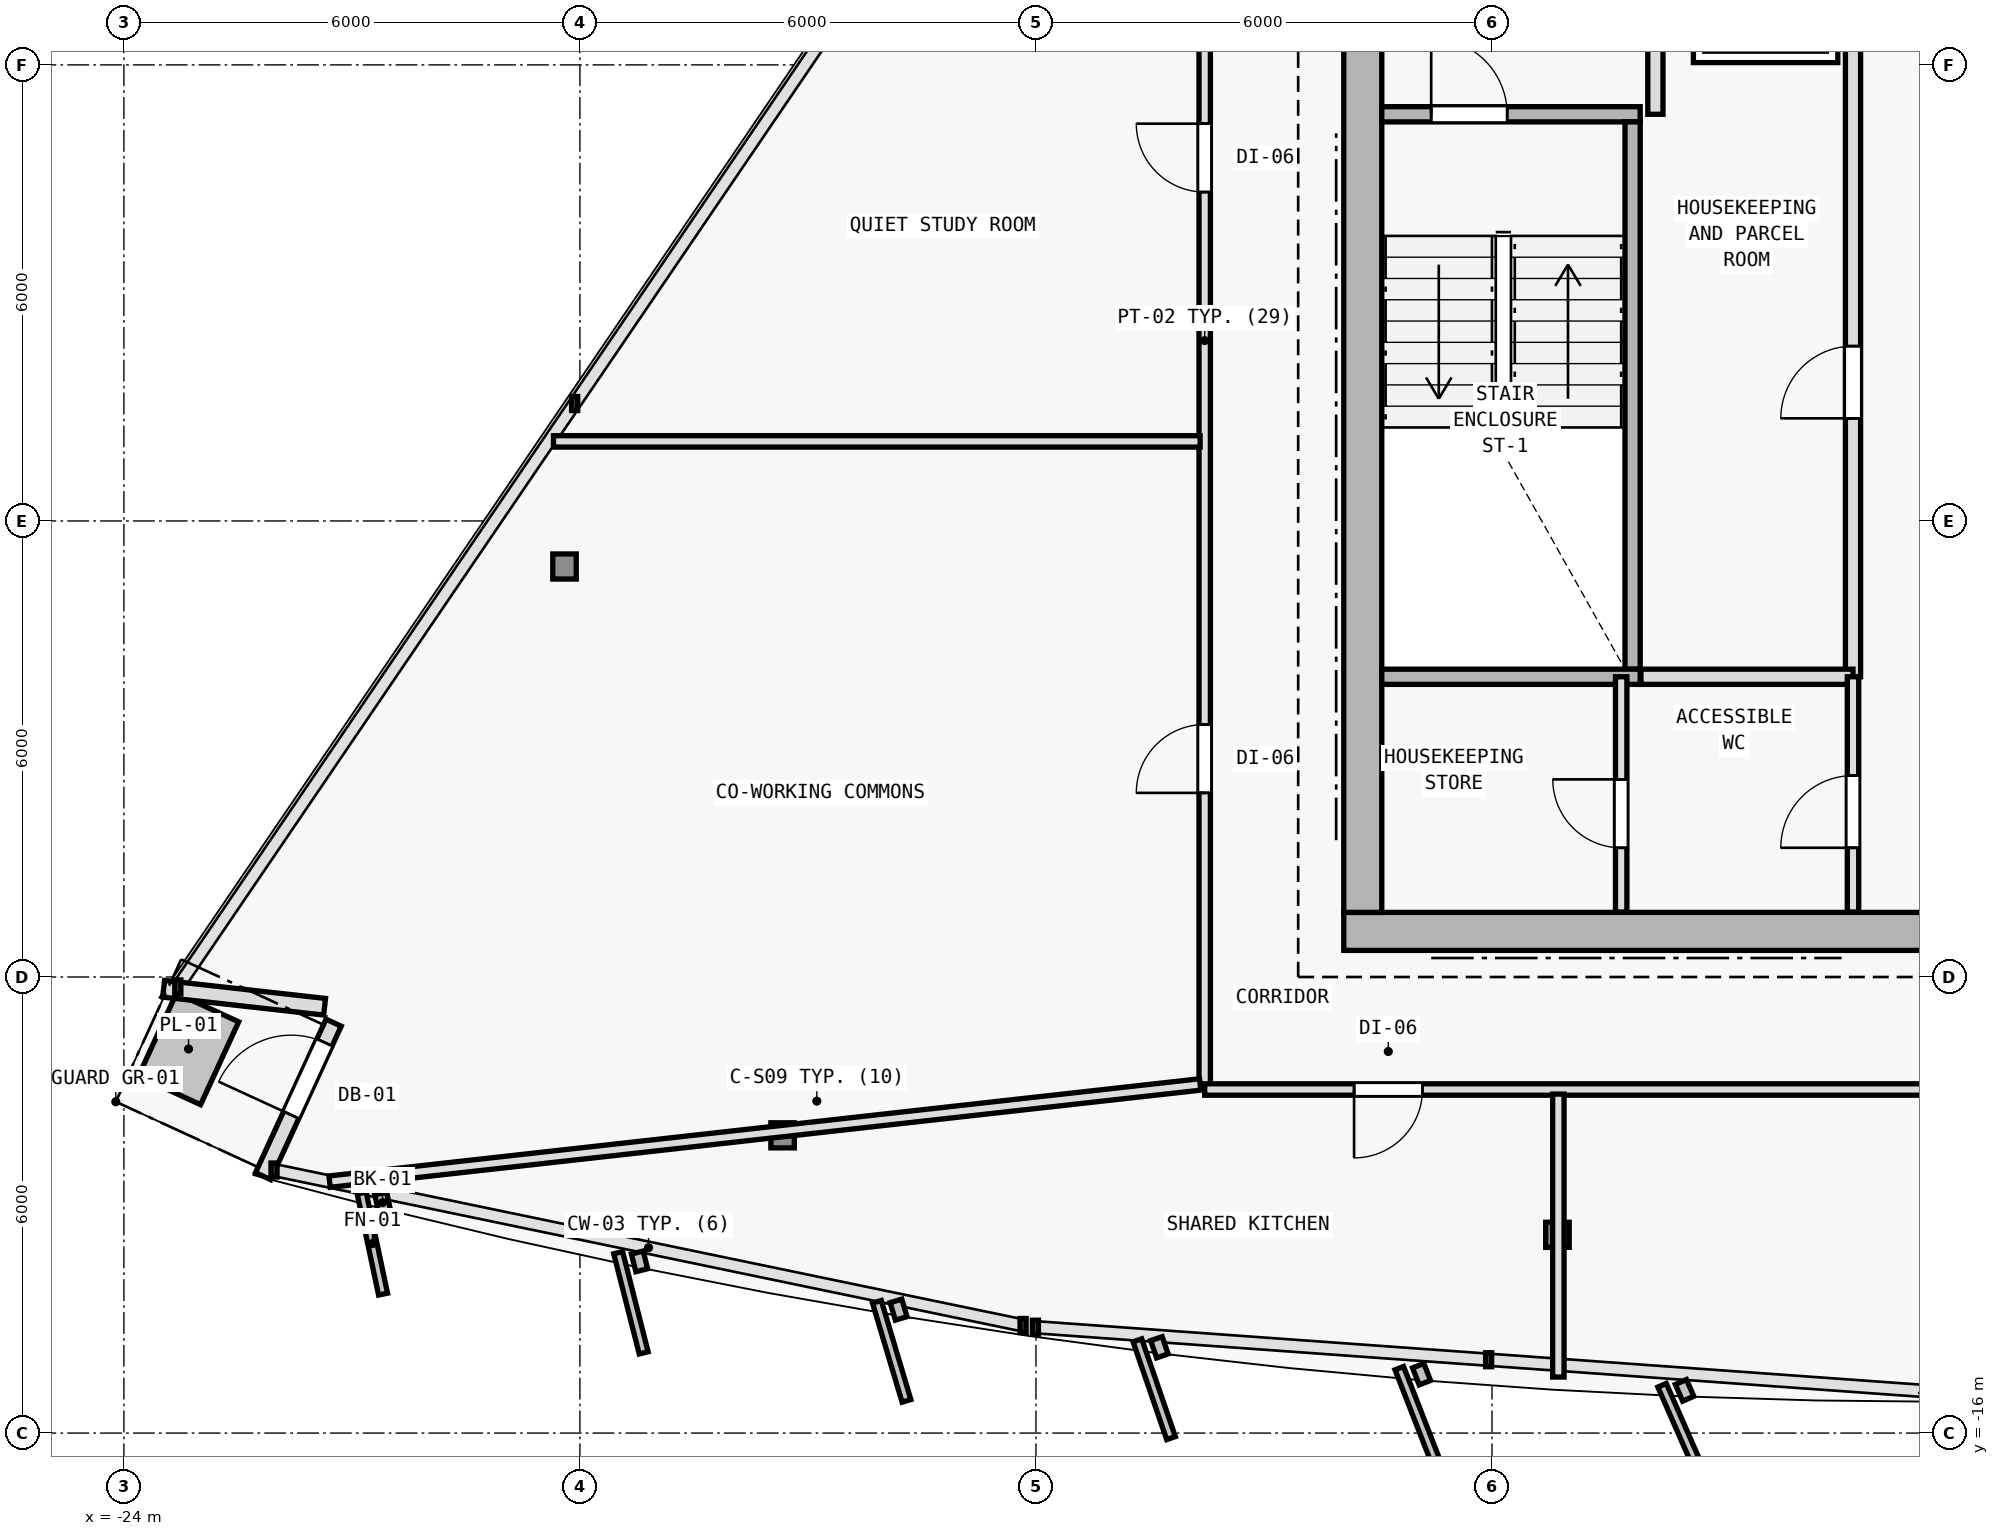
"""IFC4 building model, lengths in metres.
Left out: names, types, materials, properties, quantities, classifications, styles, units other than length and angle.
Written with IfcOpenShell. Run it as: python <this file> out.ifc"""

import sys

from ifc_helpers import new_model, si_unit, direction, frame, frame_2d, origin, origin_2d, place, context, subcontext, project, spatial, rectangle, i_section, extrude, element, fill, save


model = new_model("IFC4")
c1 = context("Model", 3, precision=1e-05, world=origin(), true_north=direction((0.0, 1.0)))
c2 = subcontext(c1, "Body", "Model", "MODEL_VIEW")
j1 = project(units=[si_unit("LENGTHUNIT", "METRE"), si_unit("PLANEANGLEUNIT", "RADIAN")], contexts=[c1])
p1 = place(None, origin())
s1 = spatial("IfcSite", under=j1, at=p1, CompositionType="ELEMENT")
p2 = place(p1, origin())
s2 = spatial("IfcBuilding", under=s1, at=p2, CompositionType="ELEMENT")
p3 = place(p2, frame((0.0, 0.0, 279.6)))
s3 = spatial("IfcBuildingStorey", under=s2, at=p3, CompositionType="ELEMENT", Elevation=279.6)
for number, where, z_axis, x_axis in (
    (1, (-7.7, -9.4, 0.0), (0.0, 0.0, 1.0), (1.0, 0.0, 0.0)),
    (2, (-7.7, 2.0, 0.0), (0.0, 0.0, 1.0), (1.0, 0.0, 0.0)),
):
    element("IfcColumn", number, at=place(p3, frame(where, z_axis=z_axis, x_axis=x_axis)), inside=s3, PredefinedType="COLUMN", context=c2, shape_type="SweptSolid", body=[
        extrude(i_section(OverallWidth=0.374, OverallDepth=0.372, WebThickness=0.012, FlangeThickness=0.02, FilletRadius=0.015, at=origin_2d()), origin(), (0.0, 0.0, 1.0), 3.6),
    ])
p4 = place(p3, frame((-15.333, -12.083, 0.005), z_axis=(0.020594893987, 0.033509183946, 0.999226193078), x_axis=(-0.851954850327, 0.523615252838, 0.0)))
e3 = element("IfcColumn", 3, at=p4, inside=s3, PredefinedType="COLUMN", context=c2, shape_type="SweptSolid", body=[
    extrude(i_section(OverallWidth=0.309, OverallDepth=0.33, WebThickness=0.011, FlangeThickness=0.019, FilletRadius=0.027, at=origin_2d()), origin(), (0.0, 0.0, 1.0), 3.592),
])
p5 = place(p3, frame((-5.139, -13.392, 0.005), z_axis=(0.006865841702, 0.035280909339, 0.999353850072), x_axis=(-0.981585848295, 0.191021523464, 0.0)))
e4 = element("IfcColumn", 4, at=p5, inside=s3, PredefinedType="COLUMN", context=c2, shape_type="SweptSolid", body=[
    extrude(i_section(OverallWidth=0.309, OverallDepth=0.33, WebThickness=0.011, FlangeThickness=0.019, FilletRadius=0.027, at=origin_2d()), origin(), (0.0, 0.0, 1.0), 3.592),
])
p6 = place(p3, frame((-18.203, -4.599, 0.005), z_axis=(0.025222449659, 0.021619242565, 0.999448065876), x_axis=(-0.650791373456, 0.759256602365, 0.0)))
e5 = element("IfcColumn", 5, at=p6, inside=s3, PredefinedType="COLUMN", context=c2, shape_type="SweptSolid", body=[
    extrude(i_section(OverallWidth=0.309, OverallDepth=0.33, WebThickness=0.011, FlangeThickness=0.019, FilletRadius=0.027, at=origin_2d()), origin(), (0.0, 0.0, 1.0), 3.591),
])
p7 = place(p3, frame((-21.36, -10.391, 0.0), z_axis=(0.0, 0.0, 1.0), x_axis=(-0.993817888275, 0.111022542511, 0.0)))
e6 = element("IfcWall", 6, at=p7, inside=s3, PredefinedType="SOLIDWALL", context=c2, shape_type="SweptSolid", body=[
    extrude(rectangle(XDim=2.131, YDim=0.22, at=frame_2d((1.065, 0.0))), origin(), (0.0, 0.0, 1.0), 3.35),
])
p8 = place(p3, frame((-22.168, -12.62, 0.0), z_axis=(0.0, 0.0, 1.0), x_axis=(0.417426589535, 0.908710648308, 0.0)))
e7 = element("IfcWall", 7, at=p8, inside=s3, PredefinedType="SOLIDWALL", context=c2, shape_type="SweptSolid", body=[
    extrude(rectangle(XDim=2.221, YDim=0.22, at=frame_2d((1.111, 0.0))), origin(), (0.0, 0.0, 1.0), 3.35),
])
p9 = place(p8, frame((0.886, 0.0, 0.0)))
e8 = element("IfcOpeningElement", 8, at=p9, cuts=e7, PredefinedType="OPENING", context=c2, shape_type="SweptSolid", body=[
    extrude(rectangle(XDim=1.05, YDim=2.15, at=frame_2d((0.525, 1.075))), frame((0.0, 0.12, 0.0), z_axis=(0.0, -1.0, 0.0), x_axis=(1.0, 0.0, 0.0)), (0.0, 0.0, 1.0), 0.24),
])
p10 = place(p3, frame((-7.95, -9.4, 0.0), z_axis=(0.0, 0.0, 1.0), x_axis=(1.0, 0.0, 0.0)))
e9 = element("IfcWall", 9, at=p10, inside=s3, PredefinedType="SHEAR", context=c2, shape_type="SweptSolid", body=[
    extrude(rectangle(XDim=15.9, YDim=0.5, at=frame_2d((7.95, 0.0))), origin(), (0.0, 0.0, 1.0), 3.35),
])
p11 = place(p10, frame((9.6, 0.0, 0.0)))
e10 = element("IfcOpeningElement", 10, at=p11, cuts=e9, PredefinedType="OPENING", context=c2, shape_type="SweptSolid", body=[
    extrude(rectangle(XDim=1.5, YDim=2.2, at=frame_2d((0.75, 1.1))), frame((0.0, 0.26, 0.0), z_axis=(0.0, -1.0, 0.0), x_axis=(1.0, 0.0, 0.0)), (0.0, 0.0, 1.0), 0.52),
])
p12 = place(p3, frame((-7.7, -9.15, 0.0), z_axis=(0.0, 0.0, 1.0), x_axis=(0.0, 1.0, 0.0)))
e11 = element("IfcWall", 11, at=p12, inside=s3, PredefinedType="SHEAR", context=c2, shape_type="SweptSolid", body=[
    extrude(rectangle(XDim=19.1, YDim=0.5, at=frame_2d((9.55, 0.0))), origin(), (0.0, 0.0, 1.0), 3.35),
])
p13 = place(p12, frame((12.7, 0.0, 0.0)))
e12 = element("IfcOpeningElement", 12, at=p13, cuts=e11, PredefinedType="OPENING", context=c2, shape_type="SweptSolid", body=[
    extrude(rectangle(XDim=1.1, YDim=2.15, at=frame_2d((0.55, 1.075))), frame((0.0, 0.26, 0.0), z_axis=(0.0, -1.0, 0.0), x_axis=(1.0, 0.0, 0.0)), (0.0, 0.0, 1.0), 0.52),
])
p14 = place(p3, frame((-7.45, 1.35, 0.0), z_axis=(0.0, 0.0, 1.0), x_axis=(1.0, 0.0, 0.0)))
e13 = element("IfcWall", 13, at=p14, inside=s3, PredefinedType="SOLIDWALL", context=c2, shape_type="SweptSolid", body=[
    extrude(rectangle(XDim=3.4, YDim=0.2, at=frame_2d((1.7, 0.0))), origin(), (0.0, 0.0, 1.0), 3.35),
])
p15 = place(p14, frame((0.65, 0.0, 0.0)))
e14 = element("IfcOpeningElement", 14, at=p15, cuts=e13, PredefinedType="OPENING", context=c2, shape_type="SweptSolid", body=[
    extrude(rectangle(XDim=1.0, YDim=2.15, at=frame_2d((0.5, 1.075))), frame((0.0, 0.11, 0.0), z_axis=(0.0, -1.0, 0.0), x_axis=(1.0, 0.0, 0.0)), (0.0, 0.0, 1.0), 0.22),
])
p16 = place(p3, frame((-4.15, -5.95, 0.0), z_axis=(0.0, 0.0, 1.0), x_axis=(0.0, 1.0, 0.0)))
e15 = element("IfcWall", 15, at=p16, inside=s3, PredefinedType="SOLIDWALL", context=c2, shape_type="SweptSolid", body=[
    extrude(rectangle(XDim=7.2, YDim=0.2, at=frame_2d((3.6, 0.0))), origin(), (0.0, 0.0, 1.0), 3.35),
])
p17 = place(p3, frame((-3.85, 1.35, 0.0), z_axis=(0.0, 0.0, 1.0), x_axis=(0.0, 1.0, 0.0)))
e16 = element("IfcWall", 16, at=p17, inside=s3, PredefinedType="SOLIDWALL", context=c2, shape_type="SweptSolid", body=[
    extrude(rectangle(XDim=8.595, YDim=0.2, at=frame_2d((4.297, 0.0))), origin(), (0.0, 0.0, 1.0), 3.35),
])
p18 = place(p17, frame((1.5, 0.0, 0.0)))
e17 = element("IfcOpeningElement", 17, at=p18, cuts=e16, PredefinedType="OPENING", context=c2, shape_type="SweptSolid", body=[
    extrude(rectangle(XDim=1.0, YDim=2.15, at=frame_2d((0.5, 1.075))), frame((0.0, 0.11, 0.0), z_axis=(0.0, -1.0, 0.0), x_axis=(1.0, 0.0, 0.0)), (0.0, 0.0, 1.0), 0.22),
])
p19 = place(p17, frame((3.18, 0.0, 0.0)))
e18 = element("IfcOpeningElement", 18, at=p19, cuts=e16, PredefinedType="OPENING", context=c2, shape_type="SweptSolid", body=[
    extrude(rectangle(XDim=1.0, YDim=2.15, at=frame_2d((0.5, 1.075))), frame((0.0, 0.11, 0.0), z_axis=(0.0, -1.0, 0.0), x_axis=(1.0, 0.0, 0.0)), (0.0, 0.0, 1.0), 0.22),
])
p20 = place(p3, frame((-1.25, -6.05, 0.0), z_axis=(0.0, 0.0, 1.0), x_axis=(0.0, 1.0, 0.0)))
e19 = element("IfcWall", 19, at=p20, inside=s3, PredefinedType="SOLIDWALL", context=c2, shape_type="SweptSolid", body=[
    extrude(rectangle(XDim=8.7, YDim=0.2, at=frame_2d((4.35, 0.0))), origin(), (0.0, 0.0, 1.0), 3.35),
])
p21 = place(p20, frame((3.4, 0.0, 0.0)))
e20 = element("IfcOpeningElement", 20, at=p21, cuts=e19, PredefinedType="OPENING", context=c2, shape_type="SweptSolid", body=[
    extrude(rectangle(XDim=0.95, YDim=2.1, at=frame_2d((0.475, 1.05))), frame((0.0, 0.11, 0.0), z_axis=(0.0, -1.0, 0.0), x_axis=(1.0, 0.0, 0.0)), (0.0, 0.0, 1.0), 0.22),
])
p22 = place(p3, frame((-7.45, -6.05, 0.0), z_axis=(0.0, 0.0, 1.0), x_axis=(1.0, 0.0, 0.0)))
e21 = element("IfcWall", 21, at=p22, inside=s3, PredefinedType="SOLIDWALL", context=c2, shape_type="SweptSolid", body=[
    extrude(rectangle(XDim=3.4, YDim=0.2, at=frame_2d((1.7, 0.0))), origin(), (0.0, 0.0, 1.0), 3.35),
])
p23 = place(p3, frame((-4.04, -6.05, 0.0), z_axis=(0.0, 0.0, 1.0), x_axis=(1.0, 0.0, 0.0)))
e22 = element("IfcWall", 22, at=p23, inside=s3, PredefinedType="SOLIDWALL", context=c2, shape_type="SweptSolid", body=[
    extrude(rectangle(XDim=2.79, YDim=0.2, at=frame_2d((1.395, 0.0))), origin(), (0.0, 0.0, 1.0), 3.35),
])
p24 = place(p3, frame((-1.25, -9.145, 0.0), z_axis=(0.0, 0.0, 1.0), x_axis=(0.0, 1.0, 0.0)))
e23 = element("IfcWall", 23, at=p24, inside=s3, PredefinedType="PARTITIONING", context=c2, shape_type="SweptSolid", body=[
    extrude(rectangle(XDim=3.095, YDim=0.15, at=frame_2d((1.547, 0.0))), origin(), (0.0, 0.0, 1.0), 3.35),
])
p25 = place(p24, frame((0.845, 0.0, 0.0)))
e24 = element("IfcOpeningElement", 24, at=p25, cuts=e23, PredefinedType="OPENING", context=c2, shape_type="SweptSolid", body=[
    extrude(rectangle(XDim=0.95, YDim=2.1, at=frame_2d((0.475, 1.05))), frame((0.0, 0.085, 0.0), z_axis=(0.0, -1.0, 0.0), x_axis=(1.0, 0.0, 0.0)), (0.0, 0.0, 1.0), 0.17),
])
p26 = place(p3, frame((-4.3, -9.145, 0.0), z_axis=(0.0, 0.0, 1.0), x_axis=(0.0, 1.0, 0.0)))
e25 = element("IfcWall", 25, at=p26, inside=s3, PredefinedType="PARTITIONING", context=c2, shape_type="SweptSolid", body=[
    extrude(rectangle(XDim=3.095, YDim=0.15, at=frame_2d((1.547, 0.0))), origin(), (0.0, 0.0, 1.0), 3.35),
])
p27 = place(p26, frame((0.845, 0.0, 0.0)))
e26 = element("IfcOpeningElement", 26, at=p27, cuts=e25, PredefinedType="OPENING", context=c2, shape_type="SweptSolid", body=[
    extrude(rectangle(XDim=0.9, YDim=2.1, at=frame_2d((0.45, 1.05))), frame((0.0, 0.085, 0.0), z_axis=(0.0, -1.0, 0.0), x_axis=(1.0, 0.0, 0.0)), (0.0, 0.0, 1.0), 0.17),
])
p28 = place(p3, frame((-9.78, -11.48, 0.0), z_axis=(0.0, 0.0, 1.0), x_axis=(0.0, 1.0, 0.0)))
e27 = element("IfcWall", 27, at=p28, inside=s3, PredefinedType="PARTITIONING", context=c2, shape_type="SweptSolid", body=[
    extrude(rectangle(XDim=19.706, YDim=0.15, at=frame_2d((9.853, 0.0))), origin(), (0.0, 0.0, 1.0), 2.825),
])
p29 = place(p28, frame((11.807, 0.0, 0.0)))
e28 = element("IfcOpeningElement", 28, at=p29, cuts=e27, PredefinedType="OPENING", context=c2, shape_type="SweptSolid", body=[
    extrude(rectangle(XDim=0.9, YDim=2.1, at=frame_2d((0.45, 1.05))), frame((0.0, 0.085, 0.0), z_axis=(0.0, -1.0, 0.0), x_axis=(1.0, 0.0, 0.0)), (0.0, 0.0, 1.0), 0.17),
])
p30 = place(p28, frame((3.903, 0.0, 0.0)))
e29 = element("IfcOpeningElement", 29, at=p30, cuts=e27, PredefinedType="OPENING", context=c2, shape_type="SweptSolid", body=[
    extrude(rectangle(XDim=0.9, YDim=2.1, at=frame_2d((0.45, 1.05))), frame((0.0, 0.085, 0.0), z_axis=(0.0, -1.0, 0.0), x_axis=(1.0, 0.0, 0.0)), (0.0, 0.0, 1.0), 0.17),
])
p31 = place(p3, frame((9.78, -11.48, 0.0), z_axis=(0.0, 0.0, 1.0), x_axis=(-1.0, 0.0, 0.0)))
e30 = element("IfcWall", 30, at=p31, inside=s3, PredefinedType="PARTITIONING", context=c2, shape_type="SweptSolid", body=[
    extrude(rectangle(XDim=19.56, YDim=0.15, at=frame_2d((9.78, 0.0))), origin(), (0.0, 0.0, 1.0), 2.875),
])
p32 = place(p31, frame((16.694, 0.0, 0.0)))
e31 = element("IfcOpeningElement", 31, at=p32, cuts=e30, PredefinedType="OPENING", context=c2, shape_type="SweptSolid", body=[
    extrude(rectangle(XDim=0.9, YDim=2.1, at=frame_2d((0.45, 1.05))), frame((0.0, 0.085, 0.0), z_axis=(0.0, -1.0, 0.0), x_axis=(1.0, 0.0, 0.0)), (0.0, 0.0, 1.0), 0.17),
])
p33 = place(p31, frame((8.556, 0.0, 0.0)))
e32 = element("IfcOpeningElement", 32, at=p33, cuts=e30, PredefinedType="OPENING", context=c2, shape_type="SweptSolid", body=[
    extrude(rectangle(XDim=0.9, YDim=2.1, at=frame_2d((0.45, 1.05))), frame((0.0, 0.085, 0.0), z_axis=(0.0, -1.0, 0.0), x_axis=(1.0, 0.0, 0.0)), (0.0, 0.0, 1.0), 0.17),
])
p34 = place(p31, frame((1.192, 0.0, 0.0)))
e33 = element("IfcOpeningElement", 33, at=p34, cuts=e30, PredefinedType="OPENING", context=c2, shape_type="SweptSolid", body=[
    extrude(rectangle(XDim=0.9, YDim=2.1, at=frame_2d((0.45, 1.05))), frame((0.0, 0.085, 0.0), z_axis=(0.0, -1.0, 0.0), x_axis=(1.0, 0.0, 0.0)), (0.0, 0.0, 1.0), 0.17),
])
p35 = place(p3, frame((-9.839, -11.414, 0.0), z_axis=(0.0, 0.0, 1.0), x_axis=(-0.993832479403, -0.1108918522, 0.0)))
e34 = element("IfcWall", 34, at=p35, inside=s3, PredefinedType="PARTITIONING", context=c2, shape_type="SweptSolid", body=[
    extrude(rectangle(XDim=11.525, YDim=0.15, at=frame_2d((5.763, 0.0))), origin(), (0.0, 0.0, 1.0), 2.875),
])
p36 = place(p3, frame((-5.127, -11.54, 0.0), z_axis=(0.0, 0.0, 1.0), x_axis=(0.0, -1.0, 0.0)))
e35 = element("IfcWall", 35, at=p36, inside=s3, PredefinedType="PARTITIONING", context=c2, shape_type="SweptSolid", body=[
    extrude(rectangle(XDim=3.723, YDim=0.15, at=frame_2d((1.861, 0.0))), origin(), (0.0, 0.0, 1.0), 2.775),
])
p37 = place(p3, frame((-9.84, -2.953, 0.0), z_axis=(0.0, 0.0, 1.0), x_axis=(-1.0, 0.0, 0.0)))
e36 = element("IfcWall", 36, at=p37, inside=s3, PredefinedType="PARTITIONING", context=c2, shape_type="SweptSolid", body=[
    extrude(rectangle(XDim=8.508, YDim=0.15, at=frame_2d((4.254, 0.0))), origin(), (0.0, 0.0, 1.0), 2.875),
])
p38 = place(p9, origin())
e37 = element("IfcDoor", 37, at=p38, inside=s3, OperationType="SINGLE_SWING_LEFT", PredefinedType="DOOR", context=c2, shape_type="SweptSolid", body=[
    extrude(rectangle(XDim=1.05, YDim=2.15, at=frame_2d((0.525, 1.075))), frame((0.0, 0.025, 0.0), z_axis=(0.0, -1.0, 0.0), x_axis=(1.0, 0.0, 0.0)), (0.0, 0.0, 1.0), 0.05),
])
fill(e8, e37)
p39 = place(p15, origin())
e38 = element("IfcDoor", 38, at=p39, inside=s3, OperationType="SINGLE_SWING_LEFT", PredefinedType="DOOR", context=c2, shape_type="SweptSolid", body=[
    extrude(rectangle(XDim=1.0, YDim=2.15, at=frame_2d((0.5, 1.075))), frame((0.0, 0.025, 0.0), z_axis=(0.0, -1.0, 0.0), x_axis=(1.0, 0.0, 0.0)), (0.0, 0.0, 1.0), 0.05),
])
fill(e14, e38)
p40 = place(p21, origin())
e39 = element("IfcDoor", 39, at=p40, inside=s3, OperationType="SINGLE_SWING_LEFT", PredefinedType="DOOR", context=c2, shape_type="SweptSolid", body=[
    extrude(rectangle(XDim=0.95, YDim=2.1, at=frame_2d((0.475, 1.05))), frame((0.0, 0.025, 0.0), z_axis=(0.0, -1.0, 0.0), x_axis=(1.0, 0.0, 0.0)), (0.0, 0.0, 1.0), 0.05),
])
fill(e20, e39)
p41 = place(p25, origin())
e40 = element("IfcDoor", 40, at=p41, inside=s3, OperationType="SINGLE_SWING_LEFT", PredefinedType="DOOR", context=c2, shape_type="SweptSolid", body=[
    extrude(rectangle(XDim=0.95, YDim=2.1, at=frame_2d((0.475, 1.05))), frame((0.0, 0.025, 0.0), z_axis=(0.0, -1.0, 0.0), x_axis=(1.0, 0.0, 0.0)), (0.0, 0.0, 1.0), 0.05),
])
fill(e24, e40)
p42 = place(p27, origin())
e41 = element("IfcDoor", 41, at=p42, inside=s3, OperationType="SINGLE_SWING_RIGHT", PredefinedType="DOOR", context=c2, shape_type="SweptSolid", body=[
    extrude(rectangle(XDim=0.9, YDim=2.1, at=frame_2d((0.45, 1.05))), frame((0.0, 0.025, 0.0), z_axis=(0.0, -1.0, 0.0), x_axis=(1.0, 0.0, 0.0)), (0.0, 0.0, 1.0), 0.05),
])
fill(e26, e41)
p43 = place(p29, origin())
e42 = element("IfcDoor", 42, at=p43, inside=s3, OperationType="SINGLE_SWING_RIGHT", PredefinedType="DOOR", context=c2, shape_type="SweptSolid", body=[
    extrude(rectangle(XDim=0.9, YDim=2.1, at=frame_2d((0.45, 1.05))), frame((0.0, 0.025, 0.0), z_axis=(0.0, -1.0, 0.0), x_axis=(1.0, 0.0, 0.0)), (0.0, 0.0, 1.0), 0.05),
])
fill(e28, e42)
p44 = place(p30, origin())
e43 = element("IfcDoor", 43, at=p44, inside=s3, OperationType="SINGLE_SWING_LEFT", PredefinedType="DOOR", context=c2, shape_type="SweptSolid", body=[
    extrude(rectangle(XDim=0.9, YDim=2.1, at=frame_2d((0.45, 1.05))), frame((0.0, 0.025, 0.0), z_axis=(0.0, -1.0, 0.0), x_axis=(1.0, 0.0, 0.0)), (0.0, 0.0, 1.0), 0.05),
])
fill(e29, e43)
p45 = place(p32, origin())
e44 = element("IfcDoor", 44, at=p45, inside=s3, OperationType="SINGLE_SWING_RIGHT", PredefinedType="DOOR", context=c2, shape_type="SweptSolid", body=[
    extrude(rectangle(XDim=0.9, YDim=2.1, at=frame_2d((0.45, 1.05))), frame((0.0, 0.025, 0.0), z_axis=(0.0, -1.0, 0.0), x_axis=(1.0, 0.0, 0.0)), (0.0, 0.0, 1.0), 0.05),
])
fill(e31, e44)
save(model, sys.argv[1])
